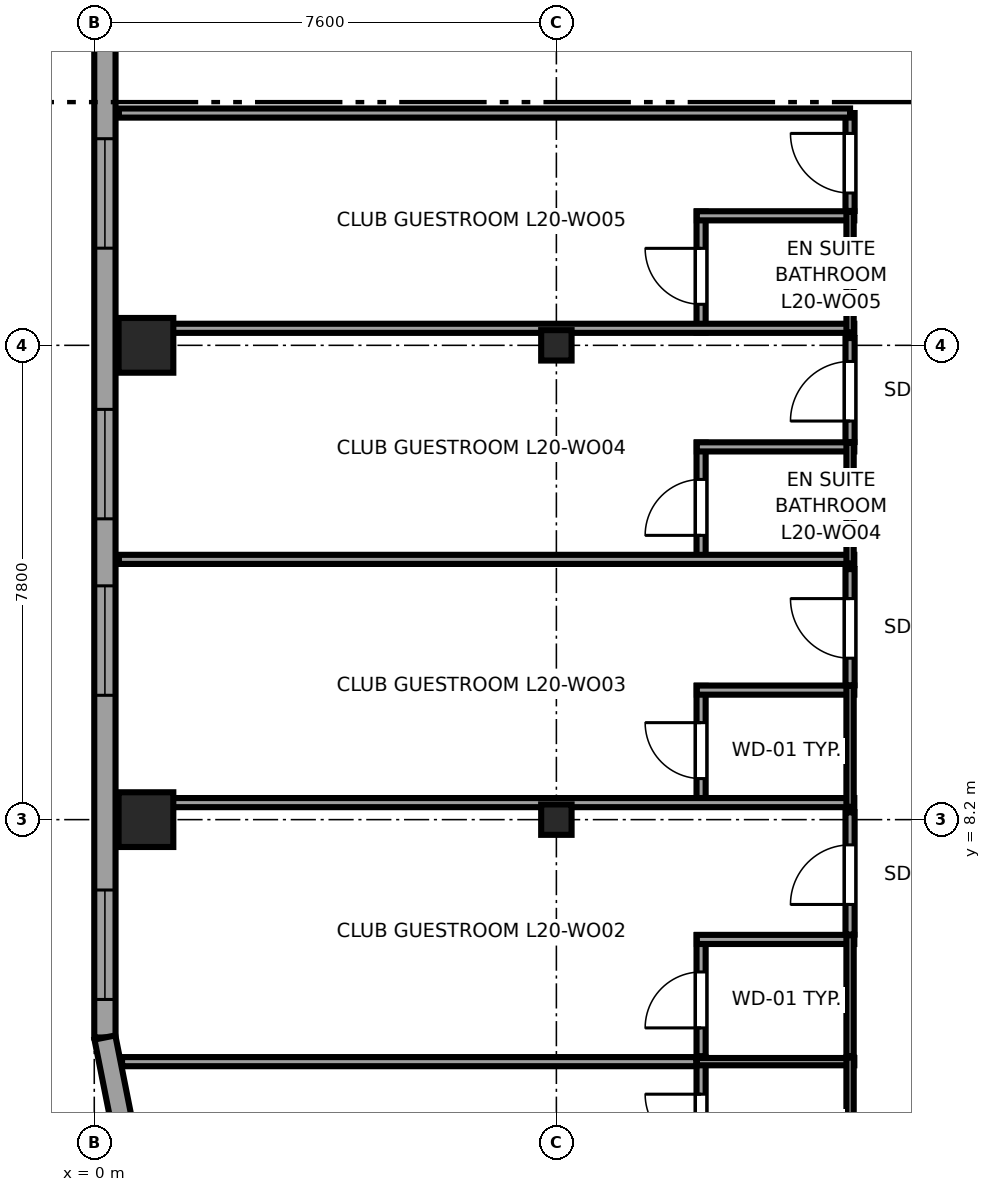
"""IFC4 building model, lengths in metres.
Left out: names, types, materials, properties, quantities, classifications, styles, units other than length and angle.
Written with IfcOpenShell. Run it as: python <this file> out.ifc"""

import sys

from ifc_helpers import new_model, si_unit, direction, frame, frame_2d, origin, origin_2d, place, context, subcontext, project, spatial, rectangle, i_section, extrude, source, transform, mapped, element, fill, save


model = new_model("IFC4")
c1 = context("Model", 3, precision=1e-05, world=origin(), true_north=direction((0.0, 1.0)))
c2 = subcontext(c1, "Body", "Model", "MODEL_VIEW")
j1 = project(units=[si_unit("LENGTHUNIT", "METRE"), si_unit("PLANEANGLEUNIT", "RADIAN")], contexts=[c1])
p1 = place(None, origin())
s1 = spatial("IfcSite", under=j1, at=p1, CompositionType="ELEMENT")
p2 = place(p1, origin())
s2 = spatial("IfcBuilding", under=s1, at=p2, CompositionType="ELEMENT")
p3 = place(p2, frame((0.0, 0.0, 81.7)))
s3 = spatial("IfcBuildingStorey", under=s2, at=p3, CompositionType="ELEMENT", Elevation=81.7)
m1 = source(origin(), c2, "Body", "SweptSolid", [
    extrude(rectangle(XDim=0.9, YDim=0.9, at=origin_2d()), origin(), (0.0, 0.0, 1.0), 3.55),
])
for number, where, z_axis, x_axis in (
    (1, (0.85, 8.2, 0.0), (0.0, 0.0, 1.0), (1.0, 0.0, 0.0)),
    (2, (0.85, 16.0, 0.0), (0.0, 0.0, 1.0), (1.0, 0.0, 0.0)),
):
    element("IfcColumn", number, at=place(p3, frame(where, z_axis=z_axis, x_axis=x_axis)), inside=s3, PredefinedType="COLUMN", context=c2, shape_type="MappedRepresentation", body=[
        mapped(m1, transform((0.0, 0.0, 0.0), x_axis=(1.0, 0.0, 0.0), y_axis=(0.0, 1.0, 0.0), z_axis=(0.0, 0.0, 1.0), scale=1.0)),
    ])
m2 = source(origin(), c2, "Body", "SweptSolid", [
    extrude(i_section(OverallWidth=0.5, OverallDepth=0.5, WebThickness=0.022, FlangeThickness=0.034, at=origin_2d()), origin(), (0.0, 0.0, 1.0), 3.55),
])
for number, where, z_axis, x_axis in (
    (3, (7.6, 8.2, 0.0), (0.0, 0.0, 1.0), (1.0, 0.0, 0.0)),
    (4, (7.6, 16.0, 0.0), (0.0, 0.0, 1.0), (1.0, 0.0, 0.0)),
):
    element("IfcColumn", number, at=place(p3, frame(where, z_axis=z_axis, x_axis=x_axis)), inside=s3, PredefinedType="COLUMN", context=c2, shape_type="MappedRepresentation", body=[
        mapped(m2, transform((0.0, 0.0, 0.0), x_axis=(1.0, 0.0, 0.0), y_axis=(0.0, 1.0, 0.0), z_axis=(0.0, 0.0, 1.0), scale=1.0)),
    ])
p4 = place(p3, frame((0.175, 41.383, 0.0), z_axis=(0.0, 0.0, 1.0), x_axis=(0.0, -1.0, 0.0)))
e5 = element("IfcWall", 5, at=p4, inside=s3, PredefinedType="SOLIDWALL", context=c2, shape_type="SweptSolid", body=[
    extrude(rectangle(XDim=36.766, YDim=0.35, at=frame_2d((18.383, 0.0))), origin(), (0.0, 0.0, 1.0), 3.37),
])
p5 = place(p4, frame((1.676, 0.0, 0.68)))
e6 = element("IfcOpeningElement", 6, at=p5, cuts=e5, PredefinedType="OPENING", context=c2, shape_type="SweptSolid", body=[
    extrude(rectangle(XDim=1.8, YDim=1.85, at=frame_2d((0.9, 0.925))), frame((0.0, 0.185, 0.0), z_axis=(0.0, -1.0, 0.0), x_axis=(1.0, 0.0, 0.0)), (0.0, 0.0, 1.0), 0.37),
])
p6 = place(p4, frame((4.578, 0.0, 0.68)))
e7 = element("IfcOpeningElement", 7, at=p6, cuts=e5, PredefinedType="OPENING", context=c2, shape_type="SweptSolid", body=[
    extrude(rectangle(XDim=1.8, YDim=1.85, at=frame_2d((0.9, 0.925))), frame((0.0, 0.185, 0.0), z_axis=(0.0, -1.0, 0.0), x_axis=(1.0, 0.0, 0.0)), (0.0, 0.0, 1.0), 0.37),
])
p7 = place(p4, frame((9.029, 0.0, 0.68)))
e8 = element("IfcOpeningElement", 8, at=p7, cuts=e5, PredefinedType="OPENING", context=c2, shape_type="SweptSolid", body=[
    extrude(rectangle(XDim=1.8, YDim=1.85, at=frame_2d((0.9, 0.925))), frame((0.0, 0.185, 0.0), z_axis=(0.0, -1.0, 0.0), x_axis=(1.0, 0.0, 0.0)), (0.0, 0.0, 1.0), 0.37),
])
p8 = place(p4, frame((21.985, 0.0, 0.68)))
e9 = element("IfcOpeningElement", 9, at=p8, cuts=e5, PredefinedType="OPENING", context=c2, shape_type="SweptSolid", body=[
    extrude(rectangle(XDim=1.8, YDim=1.85, at=frame_2d((0.9, 0.925))), frame((0.0, 0.185, 0.0), z_axis=(0.0, -1.0, 0.0), x_axis=(1.0, 0.0, 0.0)), (0.0, 0.0, 1.0), 0.37),
])
p9 = place(p4, frame((26.436, 0.0, 0.68)))
e10 = element("IfcOpeningElement", 10, at=p9, cuts=e5, PredefinedType="OPENING", context=c2, shape_type="SweptSolid", body=[
    extrude(rectangle(XDim=1.8, YDim=1.85, at=frame_2d((0.9, 0.925))), frame((0.0, 0.185, 0.0), z_axis=(0.0, -1.0, 0.0), x_axis=(1.0, 0.0, 0.0)), (0.0, 0.0, 1.0), 0.37),
])
p10 = place(p4, frame((29.338, 0.0, 0.68)))
e11 = element("IfcOpeningElement", 11, at=p10, cuts=e5, PredefinedType="OPENING", context=c2, shape_type="SweptSolid", body=[
    extrude(rectangle(XDim=1.8, YDim=1.85, at=frame_2d((0.9, 0.925))), frame((0.0, 0.185, 0.0), z_axis=(0.0, -1.0, 0.0), x_axis=(1.0, 0.0, 0.0)), (0.0, 0.0, 1.0), 0.37),
])
p11 = place(p4, frame((34.34, 0.0, 0.68)))
e12 = element("IfcOpeningElement", 12, at=p11, cuts=e5, PredefinedType="OPENING", context=c2, shape_type="SweptSolid", body=[
    extrude(rectangle(XDim=1.8, YDim=1.85, at=frame_2d((0.9, 0.925))), frame((0.0, 0.185, 0.0), z_axis=(0.0, -1.0, 0.0), x_axis=(1.0, 0.0, 0.0)), (0.0, 0.0, 1.0), 0.37),
])
p12 = place(p4, frame((16.838, 0.0, 0.62)))
e13 = element("IfcOpeningElement", 13, at=p12, cuts=e5, PredefinedType="OPENING", context=c2, shape_type="SweptSolid", body=[
    extrude(rectangle(XDim=1.5, YDim=1.55, at=frame_2d((0.75, 0.775))), frame((0.0, 0.185, 0.0), z_axis=(0.0, -1.0, 0.0), x_axis=(1.0, 0.0, 0.0)), (0.0, 0.0, 1.0), 0.37),
])
p13 = place(p3, frame((0.175, 4.617, 0.0), z_axis=(0.0, 0.0, 1.0), x_axis=(0.195011420161, -0.980800971659, 0.0)))
e14 = element("IfcWall", 14, at=p13, inside=s3, PredefinedType="SOLIDWALL", context=c2, shape_type="SweptSolid", body=[
    extrude(rectangle(XDim=1.743, YDim=0.35, at=frame_2d((0.871, 0.0))), origin(), (0.0, 0.0, 1.0), 3.37),
])
p14 = place(p3, frame((9.98, 2.3, 0.0), z_axis=(0.0, 0.0, 1.0), x_axis=(0.0, 1.0, 0.0)))
e15 = element("IfcWall", 15, at=p14, inside=s3, PredefinedType="PARTITIONING", context=c2, shape_type="SweptSolid", body=[
    extrude(rectangle(XDim=1.99, YDim=0.15, at=frame_2d((0.995, 0.0))), origin(), (0.0, 0.0, 1.0), 3.37),
])
p15 = place(p14, frame((0.465, 0.0, 0.0)))
e16 = element("IfcOpeningElement", 16, at=p15, cuts=e15, PredefinedType="OPENING", context=c2, shape_type="SweptSolid", body=[
    extrude(rectangle(XDim=0.92, YDim=2.01, at=frame_2d((0.46, 1.005))), frame((0.0, 0.085, 0.0), z_axis=(0.0, -1.0, 0.0), x_axis=(1.0, 0.0, 0.0)), (0.0, 0.0, 1.0), 0.17),
])
p16 = place(p3, frame((9.91, 4.22, 0.0), z_axis=(0.0, 0.0, 1.0), x_axis=(1.0, 0.0, 0.0)))
e17 = element("IfcWall", 17, at=p16, inside=s3, PredefinedType="PLUMBINGWALL", context=c2, shape_type="SweptSolid", body=[
    extrude(rectangle(XDim=2.59, YDim=0.12, at=frame_2d((1.295, 0.0))), origin(), (0.0, 0.0, 1.0), 3.37),
])
p17 = place(p3, frame((12.43, 2.3, 0.0), z_axis=(0.0, 0.0, 1.0), x_axis=(0.0, 1.0, 0.0)))
e18 = element("IfcWall", 18, at=p17, inside=s3, PredefinedType="PLUMBINGWALL", context=c2, shape_type="SweptSolid", body=[
    extrude(rectangle(XDim=1.99, YDim=0.12, at=frame_2d((0.995, 0.0))), origin(), (0.0, 0.0, 1.0), 3.37),
])
p18 = place(p3, frame((9.98, 4.31, 0.0), z_axis=(0.0, 0.0, 1.0), x_axis=(0.0, 1.0, 0.0)))
e19 = element("IfcWall", 19, at=p18, inside=s3, PredefinedType="PARTITIONING", context=c2, shape_type="SweptSolid", body=[
    extrude(rectangle(XDim=1.99, YDim=0.15, at=frame_2d((0.995, 0.0))), origin(), (0.0, 0.0, 1.0), 3.37),
])
p19 = place(p18, frame((0.465, 0.0, 0.0)))
e20 = element("IfcOpeningElement", 20, at=p19, cuts=e19, PredefinedType="OPENING", context=c2, shape_type="SweptSolid", body=[
    extrude(rectangle(XDim=0.92, YDim=2.01, at=frame_2d((0.46, 1.005))), frame((0.0, 0.085, 0.0), z_axis=(0.0, -1.0, 0.0), x_axis=(1.0, 0.0, 0.0)), (0.0, 0.0, 1.0), 0.17),
])
p20 = place(p3, frame((9.91, 6.23, 0.0), z_axis=(0.0, 0.0, 1.0), x_axis=(1.0, 0.0, 0.0)))
e21 = element("IfcWall", 21, at=p20, inside=s3, PredefinedType="PARTITIONING", context=c2, shape_type="SweptSolid", body=[
    extrude(rectangle(XDim=2.59, YDim=0.15, at=frame_2d((1.295, 0.0))), origin(), (0.0, 0.0, 1.0), 3.37),
])
p21 = place(p3, frame((12.43, 4.31, 0.0), z_axis=(0.0, 0.0, 1.0), x_axis=(0.0, 1.0, 0.0)))
e22 = element("IfcWall", 22, at=p21, inside=s3, PredefinedType="PLUMBINGWALL", context=c2, shape_type="SweptSolid", body=[
    extrude(rectangle(XDim=1.99, YDim=0.12, at=frame_2d((0.995, 0.0))), origin(), (0.0, 0.0, 1.0), 3.37),
])
p22 = place(p3, frame((9.98, 8.41, 0.0), z_axis=(0.0, 0.0, 1.0), x_axis=(0.0, 1.0, 0.0)))
e23 = element("IfcWall", 23, at=p22, inside=s3, PredefinedType="PARTITIONING", context=c2, shape_type="SweptSolid", body=[
    extrude(rectangle(XDim=1.99, YDim=0.15, at=frame_2d((0.995, 0.0))), origin(), (0.0, 0.0, 1.0), 3.37),
])
p23 = place(p22, frame((0.465, 0.0, 0.0)))
e24 = element("IfcOpeningElement", 24, at=p23, cuts=e23, PredefinedType="OPENING", context=c2, shape_type="SweptSolid", body=[
    extrude(rectangle(XDim=0.92, YDim=2.01, at=frame_2d((0.46, 1.005))), frame((0.0, 0.085, 0.0), z_axis=(0.0, -1.0, 0.0), x_axis=(1.0, 0.0, 0.0)), (0.0, 0.0, 1.0), 0.17),
])
p24 = place(p3, frame((0.405, 8.48, 0.0), z_axis=(0.0, 0.0, 1.0), x_axis=(1.0, 0.0, 0.0)))
e25 = element("IfcWall", 25, at=p24, inside=s3, PredefinedType="PARTITIONING", context=c2, shape_type="SweptSolid", body=[
    extrude(rectangle(XDim=12.095, YDim=0.15, at=frame_2d((6.047, 0.0))), origin(), (0.0, 0.0, 1.0), 3.37),
])
p25 = place(p3, frame((9.91, 10.33, 0.0), z_axis=(0.0, 0.0, 1.0), x_axis=(1.0, 0.0, 0.0)))
e26 = element("IfcWall", 26, at=p25, inside=s3, PredefinedType="PARTITIONING", context=c2, shape_type="SweptSolid", body=[
    extrude(rectangle(XDim=2.59, YDim=0.15, at=frame_2d((1.295, 0.0))), origin(), (0.0, 0.0, 1.0), 3.37),
])
p26 = place(p3, frame((12.43, 8.41, 0.0), z_axis=(0.0, 0.0, 1.0), x_axis=(0.0, 1.0, 0.0)))
e27 = element("IfcWall", 27, at=p26, inside=s3, PredefinedType="PLUMBINGWALL", context=c2, shape_type="SweptSolid", body=[
    extrude(rectangle(XDim=1.99, YDim=0.12, at=frame_2d((0.995, 0.0))), origin(), (0.0, 0.0, 1.0), 3.37),
])
p27 = place(p3, frame((9.98, 12.41, 0.0), z_axis=(0.0, 0.0, 1.0), x_axis=(0.0, 1.0, 0.0)))
e28 = element("IfcWall", 28, at=p27, inside=s3, PredefinedType="PARTITIONING", context=c2, shape_type="SweptSolid", body=[
    extrude(rectangle(XDim=1.99, YDim=0.15, at=frame_2d((0.995, 0.0))), origin(), (0.0, 0.0, 1.0), 3.37),
])
p28 = place(p27, frame((0.465, 0.0, 0.0)))
e29 = element("IfcOpeningElement", 29, at=p28, cuts=e28, PredefinedType="OPENING", context=c2, shape_type="SweptSolid", body=[
    extrude(rectangle(XDim=0.92, YDim=2.01, at=frame_2d((0.46, 1.005))), frame((0.0, 0.085, 0.0), z_axis=(0.0, -1.0, 0.0), x_axis=(1.0, 0.0, 0.0)), (0.0, 0.0, 1.0), 0.17),
])
p29 = place(p3, frame((0.405, 12.48, 0.0), z_axis=(0.0, 0.0, 1.0), x_axis=(1.0, 0.0, 0.0)))
e30 = element("IfcWall", 30, at=p29, inside=s3, PredefinedType="PARTITIONING", context=c2, shape_type="SweptSolid", body=[
    extrude(rectangle(XDim=12.095, YDim=0.15, at=frame_2d((6.047, 0.0))), origin(), (0.0, 0.0, 1.0), 3.37),
])
p30 = place(p3, frame((9.91, 14.33, 0.0), z_axis=(0.0, 0.0, 1.0), x_axis=(1.0, 0.0, 0.0)))
e31 = element("IfcWall", 31, at=p30, inside=s3, PredefinedType="PARTITIONING", context=c2, shape_type="SweptSolid", body=[
    extrude(rectangle(XDim=2.59, YDim=0.15, at=frame_2d((1.295, 0.0))), origin(), (0.0, 0.0, 1.0), 3.37),
])
p31 = place(p3, frame((12.43, 12.41, 0.0), z_axis=(0.0, 0.0, 1.0), x_axis=(0.0, 1.0, 0.0)))
e32 = element("IfcWall", 32, at=p31, inside=s3, PredefinedType="PLUMBINGWALL", context=c2, shape_type="SweptSolid", body=[
    extrude(rectangle(XDim=1.99, YDim=0.12, at=frame_2d((0.995, 0.0))), origin(), (0.0, 0.0, 1.0), 3.37),
])
p32 = place(p3, frame((9.98, 16.21, 0.0), z_axis=(0.0, 0.0, 1.0), x_axis=(0.0, 1.0, 0.0)))
e33 = element("IfcWall", 33, at=p32, inside=s3, PredefinedType="PARTITIONING", context=c2, shape_type="SweptSolid", body=[
    extrude(rectangle(XDim=1.99, YDim=0.15, at=frame_2d((0.995, 0.0))), origin(), (0.0, 0.0, 1.0), 3.37),
])
p33 = place(p32, frame((0.465, 0.0, 0.0)))
e34 = element("IfcOpeningElement", 34, at=p33, cuts=e33, PredefinedType="OPENING", context=c2, shape_type="SweptSolid", body=[
    extrude(rectangle(XDim=0.92, YDim=2.01, at=frame_2d((0.46, 1.005))), frame((0.0, 0.085, 0.0), z_axis=(0.0, -1.0, 0.0), x_axis=(1.0, 0.0, 0.0)), (0.0, 0.0, 1.0), 0.17),
])
p34 = place(p3, frame((0.405, 16.28, 0.0), z_axis=(0.0, 0.0, 1.0), x_axis=(1.0, 0.0, 0.0)))
e35 = element("IfcWall", 35, at=p34, inside=s3, PredefinedType="PARTITIONING", context=c2, shape_type="SweptSolid", body=[
    extrude(rectangle(XDim=12.095, YDim=0.15, at=frame_2d((6.047, 0.0))), origin(), (0.0, 0.0, 1.0), 3.37),
])
p35 = place(p3, frame((9.91, 18.13, 0.0), z_axis=(0.0, 0.0, 1.0), x_axis=(1.0, 0.0, 0.0)))
e36 = element("IfcWall", 36, at=p35, inside=s3, PredefinedType="PARTITIONING", context=c2, shape_type="SweptSolid", body=[
    extrude(rectangle(XDim=2.59, YDim=0.15, at=frame_2d((1.295, 0.0))), origin(), (0.0, 0.0, 1.0), 3.37),
])
p36 = place(p3, frame((12.43, 16.21, 0.0), z_axis=(0.0, 0.0, 1.0), x_axis=(0.0, 1.0, 0.0)))
e37 = element("IfcWall", 37, at=p36, inside=s3, PredefinedType="PLUMBINGWALL", context=c2, shape_type="SweptSolid", body=[
    extrude(rectangle(XDim=1.99, YDim=0.12, at=frame_2d((0.995, 0.0))), origin(), (0.0, 0.0, 1.0), 3.37),
])
p37 = place(p3, frame((0.457, 4.22, 0.0), z_axis=(0.0, 0.0, 1.0), x_axis=(1.0, 0.0, 0.0)))
e38 = element("IfcWall", 38, at=p37, inside=s3, PredefinedType="PARTITIONING", context=c2, shape_type="SweptSolid", body=[
    extrude(rectangle(XDim=9.443, YDim=0.15, at=frame_2d((4.721, 0.0))), origin(), (0.0, 0.0, 1.0), 3.37),
])
p38 = place(p3, frame((12.43, 6.31, 0.0), z_axis=(0.0, 0.0, 1.0), x_axis=(0.0, 1.0, 0.0)))
e39 = element("IfcWall", 39, at=p38, inside=s3, PredefinedType="PARTITIONING", context=c2, shape_type="SweptSolid", body=[
    extrude(rectangle(XDim=2.01, YDim=0.15, at=frame_2d((1.005, 0.0))), origin(), (0.0, 0.0, 1.0), 3.37),
])
p39 = place(p38, frame((0.495, 0.0, 0.0)))
e40 = element("IfcOpeningElement", 40, at=p39, cuts=e39, PredefinedType="OPENING", context=c2, shape_type="SweptSolid", body=[
    extrude(rectangle(XDim=0.98, YDim=2.12, at=frame_2d((0.49, 1.06))), frame((0.0, 0.085, 0.0), z_axis=(0.0, -1.0, 0.0), x_axis=(1.0, 0.0, 0.0)), (0.0, 0.0, 1.0), 0.17),
])
p40 = place(p3, frame((12.43, 10.41, 0.0), z_axis=(0.0, 0.0, 1.0), x_axis=(0.0, 1.0, 0.0)))
e41 = element("IfcWall", 41, at=p40, inside=s3, PredefinedType="PARTITIONING", context=c2, shape_type="SweptSolid", body=[
    extrude(rectangle(XDim=1.91, YDim=0.15, at=frame_2d((0.955, 0.0))), origin(), (0.0, 0.0, 1.0), 3.37),
])
p41 = place(p40, frame((0.445, 0.0, 0.0)))
e42 = element("IfcOpeningElement", 42, at=p41, cuts=e41, PredefinedType="OPENING", context=c2, shape_type="SweptSolid", body=[
    extrude(rectangle(XDim=0.98, YDim=2.12, at=frame_2d((0.49, 1.06))), frame((0.0, 0.085, 0.0), z_axis=(0.0, -1.0, 0.0), x_axis=(1.0, 0.0, 0.0)), (0.0, 0.0, 1.0), 0.17),
])
p42 = place(p3, frame((12.43, 14.41, 0.0), z_axis=(0.0, 0.0, 1.0), x_axis=(0.0, 1.0, 0.0)))
e43 = element("IfcWall", 43, at=p42, inside=s3, PredefinedType="PARTITIONING", context=c2, shape_type="SweptSolid", body=[
    extrude(rectangle(XDim=1.71, YDim=0.15, at=frame_2d((0.855, 0.0))), origin(), (0.0, 0.0, 1.0), 3.37),
])
p43 = place(p42, frame((0.345, 0.0, 0.0)))
e44 = element("IfcOpeningElement", 44, at=p43, cuts=e43, PredefinedType="OPENING", context=c2, shape_type="SweptSolid", body=[
    extrude(rectangle(XDim=0.98, YDim=2.12, at=frame_2d((0.49, 1.06))), frame((0.0, 0.085, 0.0), z_axis=(0.0, -1.0, 0.0), x_axis=(1.0, 0.0, 0.0)), (0.0, 0.0, 1.0), 0.17),
])
p44 = place(p3, frame((12.43, 18.21, 0.0), z_axis=(0.0, 0.0, 1.0), x_axis=(0.0, 1.0, 0.0)))
e45 = element("IfcWall", 45, at=p44, inside=s3, PredefinedType="PARTITIONING", context=c2, shape_type="SweptSolid", body=[
    extrude(rectangle(XDim=1.61, YDim=0.15, at=frame_2d((0.805, 0.0))), origin(), (0.0, 0.0, 1.0), 3.37),
])
p45 = place(p44, frame((0.295, 0.0, 0.0)))
e46 = element("IfcOpeningElement", 46, at=p45, cuts=e45, PredefinedType="OPENING", context=c2, shape_type="SweptSolid", body=[
    extrude(rectangle(XDim=0.98, YDim=2.12, at=frame_2d((0.49, 1.06))), frame((0.0, 0.085, 0.0), z_axis=(0.0, -1.0, 0.0), x_axis=(1.0, 0.0, 0.0)), (0.0, 0.0, 1.0), 0.17),
])
p46 = place(p3, frame((0.405, 19.82, 0.0), z_axis=(0.0, 0.0, 1.0), x_axis=(1.0, 0.0, 0.0)))
e47 = element("IfcWall", 47, at=p46, inside=s3, PredefinedType="PARTITIONING", context=c2, shape_type="SweptSolid", body=[
    extrude(rectangle(XDim=12.025, YDim=0.15, at=frame_2d((6.012, 0.0))), origin(), (0.0, 0.0, 1.0), 3.37),
])
m3 = source(origin(), c2, "Body", "SweptSolid", [
    extrude(rectangle(XDim=1.8, YDim=1.85, at=frame_2d((0.9, 0.925))), frame((0.0, 0.09, 0.0), z_axis=(0.0, -1.0, 0.0), x_axis=(1.0, 0.0, 0.0)), (0.0, 0.0, 1.0), 0.06),
])
p47 = place(p8, origin())
e48 = element("IfcWindow", 48, at=p47, inside=s3, PartitioningType="TRIPLE_PANEL_HORIZONTAL", PredefinedType="WINDOW", context=c2, shape_type="MappedRepresentation", body=[
    mapped(m3, transform((0.0, 0.0, 0.0), x_axis=(1.0, 0.0, 0.0), y_axis=(0.0, 1.0, 0.0), z_axis=(0.0, 0.0, 1.0), scale=1.0)),
])
fill(e9, e48)
p48 = place(p9, origin())
e49 = element("IfcWindow", 49, at=p48, inside=s3, PartitioningType="TRIPLE_PANEL_HORIZONTAL", PredefinedType="WINDOW", context=c2, shape_type="MappedRepresentation", body=[
    mapped(m3, transform((0.0, 0.0, 0.0), x_axis=(1.0, 0.0, 0.0), y_axis=(0.0, 1.0, 0.0), z_axis=(0.0, 0.0, 1.0), scale=1.0)),
])
fill(e10, e49)
p49 = place(p10, origin())
e50 = element("IfcWindow", 50, at=p49, inside=s3, PartitioningType="TRIPLE_PANEL_HORIZONTAL", PredefinedType="WINDOW", context=c2, shape_type="MappedRepresentation", body=[
    mapped(m3, transform((0.0, 0.0, 0.0), x_axis=(1.0, 0.0, 0.0), y_axis=(0.0, 1.0, 0.0), z_axis=(0.0, 0.0, 1.0), scale=1.0)),
])
fill(e11, e50)
p50 = place(p11, origin())
e51 = element("IfcWindow", 51, at=p50, inside=s3, PartitioningType="TRIPLE_PANEL_HORIZONTAL", PredefinedType="WINDOW", context=c2, shape_type="MappedRepresentation", body=[
    mapped(m3, transform((0.0, 0.0, 0.0), x_axis=(1.0, 0.0, 0.0), y_axis=(0.0, 1.0, 0.0), z_axis=(0.0, 0.0, 1.0), scale=1.0)),
])
fill(e12, e51)
m4 = source(origin(), c2, "Body", "SweptSolid", [
    extrude(rectangle(XDim=0.92, YDim=2.01, at=frame_2d((0.46, 1.005))), frame((0.0, 0.025, 0.0), z_axis=(0.0, -1.0, 0.0), x_axis=(1.0, 0.0, 0.0)), (0.0, 0.0, 1.0), 0.05),
])
p51 = place(p15, origin())
e52 = element("IfcDoor", 52, at=p51, inside=s3, OperationType="SINGLE_SWING_RIGHT", PredefinedType="DOOR", context=c2, shape_type="MappedRepresentation", body=[
    mapped(m4, transform((0.0, 0.0, 0.0), x_axis=(1.0, 0.0, 0.0), y_axis=(0.0, 1.0, 0.0), z_axis=(0.0, 0.0, 1.0), scale=1.0)),
])
fill(e16, e52)
p52 = place(p19, origin())
e53 = element("IfcDoor", 53, at=p52, inside=s3, OperationType="SINGLE_SWING_LEFT", PredefinedType="DOOR", context=c2, shape_type="MappedRepresentation", body=[
    mapped(m4, transform((0.0, 0.0, 0.0), x_axis=(1.0, 0.0, 0.0), y_axis=(0.0, 1.0, 0.0), z_axis=(0.0, 0.0, 1.0), scale=1.0)),
])
fill(e20, e53)
p53 = place(p23, origin())
e54 = element("IfcDoor", 54, at=p53, inside=s3, OperationType="SINGLE_SWING_RIGHT", PredefinedType="DOOR", context=c2, shape_type="MappedRepresentation", body=[
    mapped(m4, transform((0.0, 0.0, 0.0), x_axis=(1.0, 0.0, 0.0), y_axis=(0.0, 1.0, 0.0), z_axis=(0.0, 0.0, 1.0), scale=1.0)),
])
fill(e24, e54)
p54 = place(p28, origin())
e55 = element("IfcDoor", 55, at=p54, inside=s3, OperationType="SINGLE_SWING_LEFT", PredefinedType="DOOR", context=c2, shape_type="MappedRepresentation", body=[
    mapped(m4, transform((0.0, 0.0, 0.0), x_axis=(1.0, 0.0, 0.0), y_axis=(0.0, 1.0, 0.0), z_axis=(0.0, 0.0, 1.0), scale=1.0)),
])
fill(e29, e55)
p55 = place(p33, origin())
e56 = element("IfcDoor", 56, at=p55, inside=s3, OperationType="SINGLE_SWING_RIGHT", PredefinedType="DOOR", context=c2, shape_type="MappedRepresentation", body=[
    mapped(m4, transform((0.0, 0.0, 0.0), x_axis=(1.0, 0.0, 0.0), y_axis=(0.0, 1.0, 0.0), z_axis=(0.0, 0.0, 1.0), scale=1.0)),
])
fill(e34, e56)
m5 = source(origin(), c2, "Body", "SweptSolid", [
    extrude(rectangle(XDim=0.98, YDim=2.12, at=frame_2d((0.49, 1.06))), frame((0.0, 0.025, 0.0), z_axis=(0.0, -1.0, 0.0), x_axis=(1.0, 0.0, 0.0)), (0.0, 0.0, 1.0), 0.05),
])
p56 = place(p39, origin())
e57 = element("IfcDoor", 57, at=p56, inside=s3, OperationType="SINGLE_SWING_LEFT", PredefinedType="DOOR", context=c2, shape_type="MappedRepresentation", body=[
    mapped(m5, transform((0.0, 0.0, 0.0), x_axis=(1.0, 0.0, 0.0), y_axis=(0.0, 1.0, 0.0), z_axis=(0.0, 0.0, 1.0), scale=1.0)),
])
fill(e40, e57)
p57 = place(p41, origin())
e58 = element("IfcDoor", 58, at=p57, inside=s3, OperationType="SINGLE_SWING_RIGHT", PredefinedType="DOOR", context=c2, shape_type="MappedRepresentation", body=[
    mapped(m5, transform((0.0, 0.0, 0.0), x_axis=(1.0, 0.0, 0.0), y_axis=(0.0, 1.0, 0.0), z_axis=(0.0, 0.0, 1.0), scale=1.0)),
])
fill(e42, e58)
p58 = place(p43, origin())
e59 = element("IfcDoor", 59, at=p58, inside=s3, OperationType="SINGLE_SWING_LEFT", PredefinedType="DOOR", context=c2, shape_type="MappedRepresentation", body=[
    mapped(m5, transform((0.0, 0.0, 0.0), x_axis=(1.0, 0.0, 0.0), y_axis=(0.0, 1.0, 0.0), z_axis=(0.0, 0.0, 1.0), scale=1.0)),
])
fill(e44, e59)
p59 = place(p45, origin())
e60 = element("IfcDoor", 60, at=p59, inside=s3, OperationType="SINGLE_SWING_RIGHT", PredefinedType="DOOR", context=c2, shape_type="MappedRepresentation", body=[
    mapped(m5, transform((0.0, 0.0, 0.0), x_axis=(1.0, 0.0, 0.0), y_axis=(0.0, 1.0, 0.0), z_axis=(0.0, 0.0, 1.0), scale=1.0)),
])
fill(e46, e60)
save(model, sys.argv[1])
